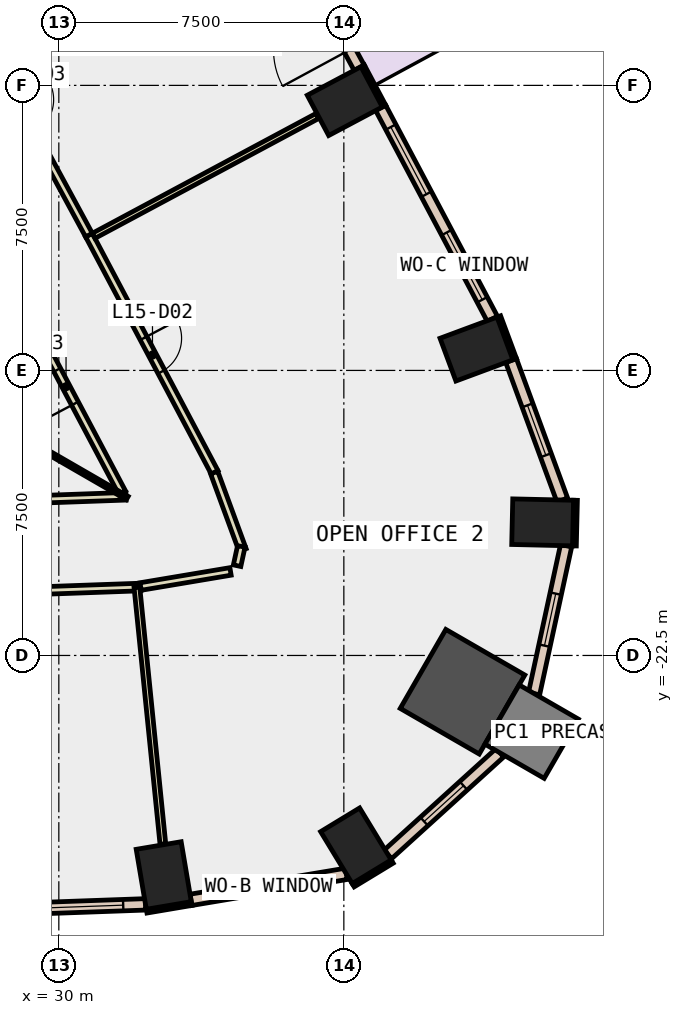
"""IFC4 building model, lengths in metres.
Left out: names, types, materials, properties, quantities, classifications, styles, units other than length and angle.
Written with IfcOpenShell. Run it as: python <this file> out.ifc"""

import sys

from ifc_helpers import new_model, si_unit, direction, frame, frame_2d, origin, origin_2d, place, context, subcontext, project, spatial, rectangle, extrude, element, fill, save


model = new_model("IFC4")
c1 = context("Model", 3, precision=1e-05, world=origin(), true_north=direction((0.0, 1.0)))
c2 = subcontext(c1, "Body", "Model", "MODEL_VIEW")
j1 = project(units=[si_unit("LENGTHUNIT", "METRE"), si_unit("PLANEANGLEUNIT", "RADIAN")], contexts=[c1])
p1 = place(None, origin())
s1 = spatial("IfcSite", under=j1, at=p1, CompositionType="ELEMENT")
p2 = place(p1, origin())
s2 = spatial("IfcBuilding", under=s1, at=p2, CompositionType="ELEMENT")
p3 = place(p2, frame((0.0, 0.0, 72.8)))
s3 = spatial("IfcBuildingStorey", under=s2, at=p3, CompositionType="ELEMENT", Elevation=72.8)
for number, where, z_axis, x_axis in (
    (1, (32.761, -28.29, -0.4), (0.0, 0.0, 1.0), (0.986, 0.167, 0.0)),
    (2, (37.818, -27.508, -0.4), (0.0, 0.0, 1.0), (0.855, 0.519, 0.0)),
):
    element("IfcColumn", number, at=place(p3, frame(where, z_axis=z_axis, x_axis=x_axis)), inside=s3, PredefinedType="COLUMN", context=c2, shape_type="SweptSolid", body=[
        extrude(rectangle(XDim=1.2, YDim=1.6, at=origin_2d()), origin(), (0.0, 0.0, 1.0), 4.2),
    ])
p4 = place(p3, frame((40.623, -23.454, -0.4), z_axis=(0.0, 0.0, 1.0), x_axis=(-0.866025403784, 0.5, 0.0)))
e3 = element("IfcColumn", 3, at=p4, inside=s3, PredefinedType="COLUMN", context=c2, shape_type="SweptSolid", body=[
    extrude(rectangle(XDim=2.4, YDim=2.4, at=origin_2d()), origin(), (0.0, 0.0, 1.0), 4.2),
])
for number, where, z_axis, x_axis in (
    (4, (42.731, -18.998, -0.4), (0.0, 0.0, 1.0), (0.023, 1.0, 0.0)),
    (5, (40.99, -14.438, -0.4), (0.0, 0.0, 1.0), (-0.348, 0.937, 0.0)),
    (6, (37.526, -7.914, -0.4), (0.0, 0.0, 1.0), (-0.469, 0.883, 0.0)),
):
    element("IfcColumn", number, at=place(p3, frame(where, z_axis=z_axis, x_axis=x_axis)), inside=s3, PredefinedType="COLUMN", context=c2, shape_type="SweptSolid", body=[
        extrude(rectangle(XDim=1.2, YDim=1.6, at=origin_2d()), origin(), (0.0, 0.0, 1.0), 4.2),
    ])
p5 = place(p3, frame((42.442, -24.504, -0.4), z_axis=(0.0, 0.0, 1.0), x_axis=(-0.866025403784, 0.5, 0.0)))
e7 = element("IfcColumn", 7, at=p5, inside=s3, PredefinedType="COLUMN", context=c2, shape_type="SweptSolid", body=[
    extrude(rectangle(XDim=1.8, YDim=1.8, at=origin_2d()), origin(), (0.0, 0.0, 1.0), 4.2),
])
p6 = place(p3, frame((41.996, -14.705, 0.0), z_axis=(0.0, 0.0, 1.0), x_axis=(-0.348446984414, 0.937328490473, 0.0)))
e8 = element("IfcWall", 8, at=p6, inside=s3, PredefinedType="STANDARD", context=c2, shape_type="SweptSolid", body=[
    extrude(rectangle(XDim=1.2, YDim=0.1, at=frame_2d((0.6, 0.0))), origin(), (0.0, 0.0, 1.0), 3.8),
])
p7 = place(p3, frame((38.558, -8.045, 0.0), z_axis=(0.0, 0.0, 1.0), x_axis=(-0.469467784567, 0.882949601763, 0.0)))
e9 = element("IfcWall", 9, at=p7, inside=s3, PredefinedType="STANDARD", context=c2, shape_type="SweptSolid", body=[
    extrude(rectangle(XDim=1.199, YDim=0.1, at=frame_2d((0.6, 0.0))), origin(), (0.0, 0.0, 1.0), 3.8),
])
p8 = place(p3, frame((32.311, -29.228, 0.0), z_axis=(0.0, 0.0, 1.0), x_axis=(0.986011774526, 0.166675674579, 0.0)))
e10 = element("IfcWall", 10, at=p8, inside=s3, PredefinedType="STANDARD", context=c2, shape_type="SweptSolid", body=[
    extrude(rectangle(XDim=1.2, YDim=0.1, at=frame_2d((0.6, 0.0))), origin(), (0.0, 0.0, 1.0), 3.8),
])
for number, where, z_axis, x_axis in (
    (11, (37.746, -28.546, 0.0), (0.0, 0.0, 1.0), (0.855, 0.519, 0.0)),
    (12, (43.567, -19.617, 0.0), (0.0, 0.0, 1.0), (0.023, 1.0, 0.0)),
):
    element("IfcWall", number, at=place(p3, frame(where, z_axis=z_axis, x_axis=x_axis)), inside=s3, PredefinedType="STANDARD", context=c2, shape_type="SweptSolid", body=[
        extrude(rectangle(XDim=1.2, YDim=0.1, at=frame_2d((0.6, 0.0))), origin(), (0.0, 0.0, 1.0), 3.8),
    ])
p9 = place(p3, frame((25.134, -29.305, 0.0), z_axis=(0.0, 0.0, 1.0), x_axis=(0.999359981296, 0.035771885388, 0.0)))
e13 = element("IfcWall", 13, at=p9, inside=s3, PredefinedType="STANDARD", context=c2, shape_type="SweptSolid", body=[
    extrude(rectangle(XDim=7.153, YDim=0.3, at=frame_2d((3.576, 0.0))), origin(), (0.0, 0.0, 1.0), 3.8),
])
p10 = place(p9, frame((0.588, 0.0, 0.9)))
e14 = element("IfcOpeningElement", 14, at=p10, cuts=e13, PredefinedType="OPENING", context=c2, shape_type="SweptSolid", body=[
    extrude(rectangle(XDim=2.4, YDim=2.6, at=frame_2d((1.2, 1.3))), frame((0.0, 0.16, 0.0), z_axis=(0.0, -1.0, 0.0), x_axis=(1.0, 0.0, 0.0)), (0.0, 0.0, 1.0), 0.32),
])
p11 = place(p9, frame((4.164, 0.0, 0.9)))
e15 = element("IfcOpeningElement", 15, at=p11, cuts=e13, PredefinedType="OPENING", context=c2, shape_type="SweptSolid", body=[
    extrude(rectangle(XDim=2.4, YDim=2.6, at=frame_2d((1.2, 1.3))), frame((0.0, 0.16, 0.0), z_axis=(0.0, -1.0, 0.0), x_axis=(1.0, 0.0, 0.0)), (0.0, 0.0, 1.0), 0.32),
])
p12 = place(p3, frame((33.477, -28.93, 0.0), z_axis=(0.0, 0.0, 1.0), x_axis=(0.986295041399, 0.164991185557, 0.0)))
e16 = element("IfcWall", 16, at=p12, inside=s3, PredefinedType="STANDARD", context=c2, shape_type="SweptSolid", body=[
    extrude(rectangle(XDim=4.145, YDim=0.3, at=frame_2d((2.072, 0.0))), origin(), (0.0, 0.0, 1.0), 3.8),
])
p13 = place(p12, frame((1.372, 0.0, 0.9)))
e17 = element("IfcOpeningElement", 17, at=p13, cuts=e16, PredefinedType="OPENING", context=c2, shape_type="SweptSolid", body=[
    extrude(rectangle(XDim=1.4, YDim=2.6, at=frame_2d((0.7, 1.3))), frame((0.0, 0.16, 0.0), z_axis=(0.0, -1.0, 0.0), x_axis=(1.0, 0.0, 0.0)), (0.0, 0.0, 1.0), 0.32),
])
p14 = place(p3, frame((38.657, -27.736, 0.0), z_axis=(0.0, 0.0, 1.0), x_axis=(0.740547309915, 0.6720042275, 0.0)))
e18 = element("IfcWall", 18, at=p14, inside=s3, PredefinedType="STANDARD", context=c2, shape_type="SweptSolid", body=[
    extrude(rectangle(XDim=3.982, YDim=0.3, at=frame_2d((1.991, 0.0))), origin(), (0.0, 0.0, 1.0), 3.8),
])
p15 = place(p14, frame((1.291, 0.0, 0.9)))
e19 = element("IfcOpeningElement", 19, at=p15, cuts=e18, PredefinedType="OPENING", context=c2, shape_type="SweptSolid", body=[
    extrude(rectangle(XDim=1.4, YDim=2.6, at=frame_2d((0.7, 1.3))), frame((0.0, 0.16, 0.0), z_axis=(0.0, -1.0, 0.0), x_axis=(1.0, 0.0, 0.0)), (0.0, 0.0, 1.0), 0.32),
])
p16 = place(p3, frame((42.506, -23.503, 0.0), z_axis=(0.0, 0.0, 1.0), x_axis=(0.211701618364, 0.977334346466, 0.0)))
e20 = element("IfcWall", 20, at=p16, inside=s3, PredefinedType="STANDARD", context=c2, shape_type="SweptSolid", body=[
    extrude(rectangle(XDim=3.982, YDim=0.3, at=frame_2d((1.991, 0.0))), origin(), (0.0, 0.0, 1.0), 3.8),
])
p17 = place(p16, frame((1.291, 0.0, 0.9)))
e21 = element("IfcOpeningElement", 21, at=p17, cuts=e20, PredefinedType="OPENING", context=c2, shape_type="SweptSolid", body=[
    extrude(rectangle(XDim=1.4, YDim=2.6, at=frame_2d((0.7, 1.3))), frame((0.0, 0.16, 0.0), z_axis=(0.0, -1.0, 0.0), x_axis=(1.0, 0.0, 0.0)), (0.0, 0.0, 1.0), 0.32),
])
p18 = place(p3, frame((43.248, -18.41, 0.0), z_axis=(0.0, 0.0, 1.0), x_axis=(-0.344819708397, 0.938668934556, 0.0)))
e22 = element("IfcWall", 22, at=p18, inside=s3, PredefinedType="STANDARD", context=c2, shape_type="SweptSolid", body=[
    extrude(rectangle(XDim=3.91, YDim=0.3, at=frame_2d((1.955, 0.0))), origin(), (0.0, 0.0, 1.0), 3.8),
])
p19 = place(p18, frame((1.255, 0.0, 0.9)))
e23 = element("IfcOpeningElement", 23, at=p19, cuts=e22, PredefinedType="OPENING", context=c2, shape_type="SweptSolid", body=[
    extrude(rectangle(XDim=1.4, YDim=2.6, at=frame_2d((0.7, 1.3))), frame((0.0, 0.16, 0.0), z_axis=(0.0, -1.0, 0.0), x_axis=(1.0, 0.0, 0.0)), (0.0, 0.0, 1.0), 0.32),
])
p20 = place(p3, frame((41.409, -13.644, 0.0), z_axis=(0.0, 0.0, 1.0), x_axis=(-0.467968066899, 0.883745375299, 0.0)))
e24 = element("IfcWall", 24, at=p20, inside=s3, PredefinedType="STANDARD", context=c2, shape_type="SweptSolid", body=[
    extrude(rectangle(XDim=6.282, YDim=0.3, at=frame_2d((3.141, 0.0))), origin(), (0.0, 0.0, 1.0), 3.8),
])
p21 = place(p20, frame((0.571, 0.0, 0.9)))
e25 = element("IfcOpeningElement", 25, at=p21, cuts=e24, PredefinedType="OPENING", context=c2, shape_type="SweptSolid", body=[
    extrude(rectangle(XDim=2.0, YDim=2.6, at=frame_2d((1.0, 1.3))), frame((0.0, 0.16, 0.0), z_axis=(0.0, -1.0, 0.0), x_axis=(1.0, 0.0, 0.0)), (0.0, 0.0, 1.0), 0.32),
])
p22 = place(p20, frame((3.712, 0.0, 0.9)))
e26 = element("IfcOpeningElement", 26, at=p22, cuts=e24, PredefinedType="OPENING", context=c2, shape_type="SweptSolid", body=[
    extrude(rectangle(XDim=2.0, YDim=2.6, at=frame_2d((1.0, 1.3))), frame((0.0, 0.16, 0.0), z_axis=(0.0, -1.0, 0.0), x_axis=(1.0, 0.0, 0.0)), (0.0, 0.0, 1.0), 0.32),
])
p23 = place(p3, frame((37.903, -7.036, 0.0), z_axis=(0.0, 0.0, 1.0), x_axis=(-0.476174096946, 0.879351027404, 0.0)))
e27 = element("IfcWall", 27, at=p23, inside=s3, PredefinedType="STANDARD", context=c2, shape_type="SweptSolid", body=[
    extrude(rectangle(XDim=6.131, YDim=0.3, at=frame_2d((3.065, 0.0))), origin(), (0.0, 0.0, 1.0), 3.8),
])
p24 = place(p23, frame((0.533, 0.0, 0.0)))
e28 = element("IfcOpeningElement", 28, at=p24, cuts=e27, PredefinedType="OPENING", context=c2, shape_type="SweptSolid", body=[
    extrude(rectangle(XDim=2.0, YDim=2.4, at=frame_2d((1.0, 1.2))), frame((0.0, 0.16, 0.0), z_axis=(0.0, -1.0, 0.0), x_axis=(1.0, 0.0, 0.0)), (0.0, 0.0, 1.0), 0.32),
])
p25 = place(p23, frame((3.598, 0.0, 0.9)))
e29 = element("IfcOpeningElement", 29, at=p25, cuts=e27, PredefinedType="OPENING", context=c2, shape_type="SweptSolid", body=[
    extrude(rectangle(XDim=2.0, YDim=2.6, at=frame_2d((1.0, 1.3))), frame((0.0, 0.16, 0.0), z_axis=(0.0, -1.0, 0.0), x_axis=(1.0, 0.0, 0.0)), (0.0, 0.0, 1.0), 0.32),
])
p26 = place(p3, frame((24.208, -18.581, 0.0), z_axis=(0.0, 0.0, 1.0), x_axis=(0.99936260762, 0.035698438215, 0.0)))
e30 = element("IfcWall", 30, at=p26, inside=s3, PredefinedType="PARTITIONING", context=c2, shape_type="SweptSolid", body=[
    extrude(rectangle(XDim=7.564, YDim=0.2, at=frame_2d((3.782, 0.0))), origin(), (0.0, 0.0, 1.0), 3.8),
])
p27 = place(p26, frame((3.282, 0.0, 0.0)))
e31 = element("IfcOpeningElement", 31, at=p27, cuts=e30, PredefinedType="OPENING", context=c2, shape_type="SweptSolid", body=[
    extrude(rectangle(XDim=1.0, YDim=2.1, at=frame_2d((0.5, 1.05))), frame((0.0, 0.11, 0.0), z_axis=(0.0, -1.0, 0.0), x_axis=(1.0, 0.0, 0.0)), (0.0, 0.0, 1.0), 0.22),
])
p28 = place(p3, frame((31.668, -18.219, 0.0), z_axis=(0.0, 0.0, 1.0), x_axis=(-0.468058220157, 0.883697630722, 0.0)))
e32 = element("IfcWall", 32, at=p28, inside=s3, PredefinedType="PARTITIONING", context=c2, shape_type="SweptSolid", body=[
    extrude(rectangle(XDim=6.316, YDim=0.2, at=frame_2d((3.158, 0.0))), origin(), (0.0, 0.0, 1.0), 3.8),
])
p29 = place(p28, frame((2.658, 0.0, 0.0)))
e33 = element("IfcOpeningElement", 33, at=p29, cuts=e32, PredefinedType="OPENING", context=c2, shape_type="SweptSolid", body=[
    extrude(rectangle(XDim=1.0, YDim=2.1, at=frame_2d((0.5, 1.05))), frame((0.0, 0.11, 0.0), z_axis=(0.0, -1.0, 0.0), x_axis=(1.0, 0.0, 0.0)), (0.0, 0.0, 1.0), 0.22),
])
p30 = place(p3, frame((32.154, -20.699, 0.0), z_axis=(0.0, 0.0, 1.0), x_axis=(-0.999363643656, -0.035669423029, 0.0)))
e34 = element("IfcWall", 34, at=p30, inside=s3, PredefinedType="PARTITIONING", context=c2, shape_type="SweptSolid", body=[
    extrude(rectangle(XDim=7.878, YDim=0.2, at=frame_2d((3.939, 0.0))), origin(), (0.0, 0.0, 1.0), 3.8),
])
p31 = place(p3, frame((30.793, -11.439, 0.0), z_axis=(0.0, 0.0, 1.0), x_axis=(0.468043291185, -0.883705537822, 0.0)))
e35 = element("IfcWall", 35, at=p31, inside=s3, PredefinedType="PARTITIONING", context=c2, shape_type="SweptSolid", body=[
    extrude(rectangle(XDim=7.066, YDim=0.2, at=frame_2d((3.533, 0.0))), origin(), (0.0, 0.0, 1.0), 3.8),
])
p32 = place(p31, frame((3.071, 0.0, 0.0)))
e36 = element("IfcOpeningElement", 36, at=p32, cuts=e35, PredefinedType="OPENING", context=c2, shape_type="SweptSolid", body=[
    extrude(rectangle(XDim=1.0, YDim=2.1, at=frame_2d((0.5, 1.05))), frame((0.0, 0.11, 0.0), z_axis=(0.0, -1.0, 0.0), x_axis=(1.0, 0.0, 0.0)), (0.0, 0.0, 1.0), 0.22),
])
p33 = place(p3, frame((34.088, -17.689, 0.0), z_axis=(0.0, 0.0, 1.0), x_axis=(0.34459875492, -0.938750072228, 0.0)))
e37 = element("IfcWall", 37, at=p33, inside=s3, PredefinedType="PARTITIONING", context=c2, shape_type="SweptSolid", body=[
    extrude(rectangle(XDim=2.168, YDim=0.2, at=frame_2d((1.084, 0.0))), origin(), (0.0, 0.0, 1.0), 3.8),
])
p34 = place(p3, frame((34.801, -19.631, 0.0), z_axis=(0.0, 0.0, 1.0), x_axis=(-0.212292845768, -0.977206092713, 0.0)))
e38 = element("IfcWall", 38, at=p34, inside=s3, PredefinedType="PARTITIONING", context=c2, shape_type="SweptSolid", body=[
    extrude(rectangle(XDim=0.519, YDim=0.2, at=frame_2d((0.259, 0.0))), origin(), (0.0, 0.0, 1.0), 3.8),
])
p35 = place(p3, frame((34.518, -20.289, 0.0), z_axis=(0.0, 0.0, 1.0), x_axis=(-0.986214562432, -0.165471559025, 0.0)))
e39 = element("IfcWall", 39, at=p35, inside=s3, PredefinedType="PARTITIONING", context=c2, shape_type="SweptSolid", body=[
    extrude(rectangle(XDim=2.399, YDim=0.2, at=frame_2d((1.199, 0.0))), origin(), (0.0, 0.0, 1.0), 3.8),
])
p36 = place(p3, frame((27.339, -5.062, 0.0), z_axis=(0.0, 0.0, 1.0), x_axis=(0.476248444599, -0.879310763619, 0.0)))
e40 = element("IfcWall", 40, at=p36, inside=s3, PredefinedType="PARTITIONING", context=c2, shape_type="SweptSolid", body=[
    extrude(rectangle(XDim=7.252, YDim=0.2, at=frame_2d((3.626, 0.0))), origin(), (0.0, 0.0, 1.0), 3.8),
])
p37 = place(p36, frame((3.201, 0.0, 0.0)))
e41 = element("IfcOpeningElement", 41, at=p37, cuts=e40, PredefinedType="OPENING", context=c2, shape_type="SweptSolid", body=[
    extrude(rectangle(XDim=1.0, YDim=2.1, at=frame_2d((0.5, 1.05))), frame((0.0, 0.11, 0.0), z_axis=(0.0, -1.0, 0.0), x_axis=(1.0, 0.0, 0.0)), (0.0, 0.0, 1.0), 0.22),
])
p38 = place(p3, frame((22.929, -13.235, 0.0), z_axis=(0.0, 0.0, 1.0), x_axis=(0.866003823807, -0.500037375755, 0.0)))
e42 = element("IfcWall", 42, at=p38, inside=s3, PredefinedType="PARTITIONING", context=c2, shape_type="SweptSolid", body=[
    extrude(rectangle(XDim=10.245, YDim=0.1, at=frame_2d((5.123, 0.0))), origin(), (0.0, 0.0, 1.0), 3.8),
])
p39 = place(p3, frame((32.054, -20.702, 0.0), z_axis=(0.0, 0.0, 1.0), x_axis=(0.100681219953, -0.994918736354, 0.0)))
e43 = element("IfcWall", 43, at=p39, inside=s3, PredefinedType="PARTITIONING", context=c2, shape_type="SweptSolid", body=[
    extrude(rectangle(XDim=6.794, YDim=0.15, at=frame_2d((3.397, 0.0))), origin(), (0.0, 0.0, 1.0), 3.8),
])
p40 = place(p3, frame((30.916, -11.458, 0.0), z_axis=(0.0, 0.0, 1.0), x_axis=(0.881525059883, 0.472137235132, 0.0)))
e44 = element("IfcWall", 44, at=p40, inside=s3, PredefinedType="PARTITIONING", context=c2, shape_type="SweptSolid", body=[
    extrude(rectangle(XDim=6.68, YDim=0.15, at=frame_2d((3.34, 0.0))), origin(), (0.0, 0.0, 1.0), 3.8),
])
p41 = place(p11, origin())
e45 = element("IfcWindow", 45, at=p41, inside=s3, PartitioningType="SINGLE_PANEL", PredefinedType="WINDOW", context=c2, shape_type="SweptSolid", body=[
    extrude(rectangle(XDim=2.4, YDim=2.6, at=frame_2d((1.2, 1.3))), frame((0.0, 0.03, 0.0), z_axis=(0.0, -1.0, 0.0), x_axis=(1.0, 0.0, 0.0)), (0.0, 0.0, 1.0), 0.06),
])
fill(e15, e45)
p42 = place(p13, origin())
e46 = element("IfcWindow", 46, at=p42, inside=s3, PartitioningType="SINGLE_PANEL", PredefinedType="WINDOW", context=c2, shape_type="SweptSolid", body=[
    extrude(rectangle(XDim=1.4, YDim=2.6, at=frame_2d((0.7, 1.3))), frame((0.0, 0.03, 0.0), z_axis=(0.0, -1.0, 0.0), x_axis=(1.0, 0.0, 0.0)), (0.0, 0.0, 1.0), 0.06),
])
fill(e17, e46)
p43 = place(p15, origin())
e47 = element("IfcWindow", 47, at=p43, inside=s3, PartitioningType="SINGLE_PANEL", PredefinedType="WINDOW", context=c2, shape_type="SweptSolid", body=[
    extrude(rectangle(XDim=1.4, YDim=2.6, at=frame_2d((0.7, 1.3))), frame((0.0, 0.03, 0.0), z_axis=(0.0, -1.0, 0.0), x_axis=(1.0, 0.0, 0.0)), (0.0, 0.0, 1.0), 0.06),
])
fill(e19, e47)
p44 = place(p17, origin())
e48 = element("IfcWindow", 48, at=p44, inside=s3, PartitioningType="SINGLE_PANEL", PredefinedType="WINDOW", context=c2, shape_type="SweptSolid", body=[
    extrude(rectangle(XDim=1.4, YDim=2.6, at=frame_2d((0.7, 1.3))), frame((0.0, 0.03, 0.0), z_axis=(0.0, -1.0, 0.0), x_axis=(1.0, 0.0, 0.0)), (0.0, 0.0, 1.0), 0.06),
])
fill(e21, e48)
p45 = place(p19, origin())
e49 = element("IfcWindow", 49, at=p45, inside=s3, PartitioningType="SINGLE_PANEL", PredefinedType="WINDOW", context=c2, shape_type="SweptSolid", body=[
    extrude(rectangle(XDim=1.4, YDim=2.6, at=frame_2d((0.7, 1.3))), frame((0.0, 0.03, 0.0), z_axis=(0.0, -1.0, 0.0), x_axis=(1.0, 0.0, 0.0)), (0.0, 0.0, 1.0), 0.06),
])
fill(e23, e49)
p46 = place(p21, origin())
e50 = element("IfcWindow", 50, at=p46, inside=s3, PartitioningType="SINGLE_PANEL", PredefinedType="WINDOW", context=c2, shape_type="SweptSolid", body=[
    extrude(rectangle(XDim=2.0, YDim=2.6, at=frame_2d((1.0, 1.3))), frame((0.0, 0.03, 0.0), z_axis=(0.0, -1.0, 0.0), x_axis=(1.0, 0.0, 0.0)), (0.0, 0.0, 1.0), 0.06),
])
fill(e25, e50)
p47 = place(p22, origin())
e51 = element("IfcWindow", 51, at=p47, inside=s3, PartitioningType="SINGLE_PANEL", PredefinedType="WINDOW", context=c2, shape_type="SweptSolid", body=[
    extrude(rectangle(XDim=2.0, YDim=2.6, at=frame_2d((1.0, 1.3))), frame((0.0, 0.03, 0.0), z_axis=(0.0, -1.0, 0.0), x_axis=(1.0, 0.0, 0.0)), (0.0, 0.0, 1.0), 0.06),
])
fill(e26, e51)
p48 = place(p32, origin())
e52 = element("IfcDoor", 52, at=p48, inside=s3, OperationType="SINGLE_SWING_RIGHT", PredefinedType="DOOR", context=c2, shape_type="SweptSolid", body=[
    extrude(rectangle(XDim=1.0, YDim=2.1, at=frame_2d((0.5, 1.05))), frame((0.0, 0.025, 0.0), z_axis=(0.0, -1.0, 0.0), x_axis=(1.0, 0.0, 0.0)), (0.0, 0.0, 1.0), 0.05),
])
fill(e36, e52)
p49 = place(p29, origin())
e53 = element("IfcDoor", 53, at=p49, inside=s3, OperationType="SINGLE_SWING_LEFT", PredefinedType="DOOR", context=c2, shape_type="SweptSolid", body=[
    extrude(rectangle(XDim=1.0, YDim=2.1, at=frame_2d((0.5, 1.05))), frame((0.0, 0.025, 0.0), z_axis=(0.0, -1.0, 0.0), x_axis=(1.0, 0.0, 0.0)), (0.0, 0.0, 1.0), 0.05),
])
fill(e33, e53)
save(model, sys.argv[1])
